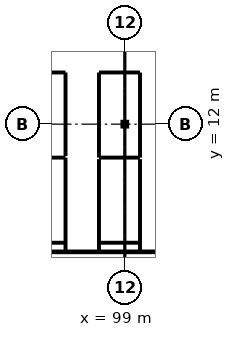
"""IFC4 building model, lengths in metres.
Left out: names, types, materials, properties, quantities, classifications, styles, units other than length and angle.
Written with IfcOpenShell. Run it as: python <this file> out.ifc"""

import sys

from ifc_helpers import new_model, si_unit, direction, frame, frame_2d, origin, origin_2d, place, context, subcontext, project, spatial, rectangle, i_section, extrude, element, fill, save


model = new_model("IFC4")
c1 = context("Model", 3, precision=1e-05, world=origin(), true_north=direction((0.0, 1.0)))
c2 = subcontext(c1, "Body", "Model", "MODEL_VIEW")
j1 = project(units=[si_unit("LENGTHUNIT", "METRE"), si_unit("PLANEANGLEUNIT", "RADIAN")], contexts=[c1])
p1 = place(None, origin())
s1 = spatial("IfcSite", under=j1, at=p1, CompositionType="ELEMENT")
p2 = place(p1, origin())
s2 = spatial("IfcBuilding", under=s1, at=p2, CompositionType="ELEMENT")
p3 = place(p2, frame((0.0, 0.0, 35.4)))
s3 = spatial("IfcBuildingStorey", under=s2, at=p3, CompositionType="ELEMENT", Elevation=35.4)
p4 = place(p3, frame((99.0, 12.0, 0.0), z_axis=(0.0, 0.0, 1.0), x_axis=(1.0, 0.0, 0.0)))
e1 = element("IfcColumn", 1, at=p4, inside=s3, PredefinedType="COLUMN", context=c2, shape_type="SweptSolid", body=[
    extrude(i_section(OverallWidth=0.26, OverallDepth=0.26, WebThickness=0.01, FlangeThickness=0.018, at=origin_2d()), origin(), (0.0, 0.0, 1.0), 3.8),
])
p5 = place(p3, frame((45.88, 3.6, 0.0), z_axis=(0.0, 0.0, 1.0), x_axis=(1.0, 0.0, 0.0)))
e2 = element("IfcWall", 2, at=p5, inside=s3, PredefinedType="PARTITIONING", context=c2, shape_type="SweptSolid", body=[
    extrude(rectangle(XDim=58.24, YDim=0.15, at=frame_2d((29.12, 0.0))), origin(), (0.0, 0.0, 1.0), 3.64),
])
p6 = place(p5, frame((27.795, 0.0, 0.0)))
e3 = element("IfcOpeningElement", 3, at=p6, cuts=e2, PredefinedType="OPENING", context=c2, shape_type="SweptSolid", body=[
    extrude(rectangle(XDim=1.05, YDim=2.25, at=frame_2d((0.525, 1.125))), frame((0.0, 0.09, 0.0), z_axis=(0.0, -1.0, 0.0), x_axis=(1.0, 0.0, 0.0)), (0.0, 0.0, 1.0), 0.18),
])
for number, where, z_axis, x_axis in (
    (4, (95.02, 4.2, 0.0), (0.0, 0.0, 1.0), (-1.0, 0.0, 0.0)),
    (5, (92.055, 9.8, 0.0), (0.0, 0.0, 1.0), (1.0, 0.0, 0.0)),
):
    element("IfcWall", number, at=place(p3, frame(where, z_axis=z_axis, x_axis=x_axis)), inside=s3, PredefinedType="PARTITIONING", context=c2, shape_type="SweptSolid", body=[
        extrude(rectangle(XDim=2.965, YDim=0.1, at=frame_2d((1.482, 0.0))), origin(), (0.0, 0.0, 1.0), 3.64),
    ])
p7 = place(p3, frame((95.1, 9.72, 0.0), z_axis=(0.0, 0.0, 1.0), x_axis=(0.0, -1.0, 0.0)))
e6 = element("IfcWall", 6, at=p7, inside=s3, PredefinedType="PARTITIONING", context=c2, shape_type="SweptSolid", body=[
    extrude(rectangle(XDim=6.05, YDim=0.1, at=frame_2d((3.025, 0.0))), origin(), (0.0, 0.0, 1.0), 3.64),
])
p8 = place(p7, frame((2.529, 0.0, 0.0)))
e7 = element("IfcOpeningElement", 7, at=p8, cuts=e6, PredefinedType="OPENING", context=c2, shape_type="SweptSolid", body=[
    extrude(rectangle(XDim=0.9, YDim=2.05, at=frame_2d((0.45, 1.025))), frame((0.0, 0.065, 0.0), z_axis=(0.0, -1.0, 0.0), x_axis=(1.0, 0.0, 0.0)), (0.0, 0.0, 1.0), 0.13),
])
p9 = place(p3, frame((92.48, 15.4, 0.0), z_axis=(0.0, 0.0, 1.0), x_axis=(1.0, 0.0, 0.0)))
e8 = element("IfcWall", 8, at=p9, inside=s3, PredefinedType="PARTITIONING", context=c2, shape_type="SweptSolid", body=[
    extrude(rectangle(XDim=2.54, YDim=0.1, at=frame_2d((1.27, 0.0))), origin(), (0.0, 0.0, 1.0), 3.64),
])
p10 = place(p3, frame((95.1, 15.32, 0.0), z_axis=(0.0, 0.0, 1.0), x_axis=(0.0, -1.0, 0.0)))
e9 = element("IfcWall", 9, at=p10, inside=s3, PredefinedType="PARTITIONING", context=c2, shape_type="SweptSolid", body=[
    extrude(rectangle(XDim=5.34, YDim=0.1, at=frame_2d((2.67, 0.0))), origin(), (0.0, 0.0, 1.0), 3.64),
])
p11 = place(p10, frame((2.22, 0.0, 0.0)))
e10 = element("IfcOpeningElement", 10, at=p11, cuts=e9, PredefinedType="OPENING", context=c2, shape_type="SweptSolid", body=[
    extrude(rectangle(XDim=0.9, YDim=2.05, at=frame_2d((0.45, 1.025))), frame((0.0, 0.065, 0.0), z_axis=(0.0, -1.0, 0.0), x_axis=(1.0, 0.0, 0.0)), (0.0, 0.0, 1.0), 0.13),
])
p12 = place(p3, frame((97.38, 15.4, 0.0), z_axis=(0.0, 0.0, 1.0), x_axis=(1.0, 0.0, 0.0)))
e11 = element("IfcWall", 11, at=p12, inside=s3, PredefinedType="PARTITIONING", context=c2, shape_type="SweptSolid", body=[
    extrude(rectangle(XDim=2.54, YDim=0.1, at=frame_2d((1.27, 0.0))), origin(), (0.0, 0.0, 1.0), 3.64),
])
p13 = place(p3, frame((100.0, 15.32, 0.0), z_axis=(0.0, 0.0, 1.0), x_axis=(0.0, -1.0, 0.0)))
e12 = element("IfcWall", 12, at=p13, inside=s3, PredefinedType="PARTITIONING", context=c2, shape_type="SweptSolid", body=[
    extrude(rectangle(XDim=5.44, YDim=0.1, at=frame_2d((2.72, 0.0))), origin(), (0.0, 0.0, 1.0), 3.64),
])
p14 = place(p3, frame((99.92, 9.8, 0.0), z_axis=(0.0, 0.0, 1.0), x_axis=(-1.0, 0.0, 0.0)))
e13 = element("IfcWall", 13, at=p14, inside=s3, PredefinedType="PARTITIONING", context=c2, shape_type="SweptSolid", body=[
    extrude(rectangle(XDim=2.54, YDim=0.1, at=frame_2d((1.27, 0.0))), origin(), (0.0, 0.0, 1.0), 3.64),
])
p15 = place(p3, frame((97.3, 9.88, 0.0), z_axis=(0.0, 0.0, 1.0), x_axis=(0.0, 1.0, 0.0)))
e14 = element("IfcWall", 14, at=p15, inside=s3, PredefinedType="PARTITIONING", context=c2, shape_type="SweptSolid", body=[
    extrude(rectangle(XDim=5.44, YDim=0.1, at=frame_2d((2.72, 0.0))), origin(), (0.0, 0.0, 1.0), 3.64),
])
p16 = place(p15, frame((2.22, 0.0, 0.0)))
e15 = element("IfcOpeningElement", 15, at=p16, cuts=e14, PredefinedType="OPENING", context=c2, shape_type="SweptSolid", body=[
    extrude(rectangle(XDim=1.0, YDim=2.1, at=frame_2d((0.5, 1.05))), frame((0.0, 0.065, 0.0), z_axis=(0.0, -1.0, 0.0), x_axis=(1.0, 0.0, 0.0)), (0.0, 0.0, 1.0), 0.13),
])
p17 = place(p3, frame((100.0, 9.62, 0.0), z_axis=(0.0, 0.0, 1.0), x_axis=(0.0, -1.0, 0.0)))
e16 = element("IfcWall", 16, at=p17, inside=s3, PredefinedType="PARTITIONING", context=c2, shape_type="SweptSolid", body=[
    extrude(rectangle(XDim=5.95, YDim=0.1, at=frame_2d((2.975, 0.0))), origin(), (0.0, 0.0, 1.0), 3.64),
])
p18 = place(p3, frame((99.955, 4.2, 0.0), z_axis=(0.0, 0.0, 1.0), x_axis=(-1.0, 0.0, 0.0)))
e17 = element("IfcWall", 17, at=p18, inside=s3, PredefinedType="PARTITIONING", context=c2, shape_type="SweptSolid", body=[
    extrude(rectangle(XDim=2.575, YDim=0.1, at=frame_2d((1.288, 0.0))), origin(), (0.0, 0.0, 1.0), 3.64),
])
p19 = place(p3, frame((97.3, 3.67, 0.0), z_axis=(0.0, 0.0, 1.0), x_axis=(0.0, 1.0, 0.0)))
e18 = element("IfcWall", 18, at=p19, inside=s3, PredefinedType="PARTITIONING", context=c2, shape_type="SweptSolid", body=[
    extrude(rectangle(XDim=5.95, YDim=0.1, at=frame_2d((2.975, 0.0))), origin(), (0.0, 0.0, 1.0), 3.64),
])
p20 = place(p19, frame((2.571, 0.0, 0.0)))
e19 = element("IfcOpeningElement", 19, at=p20, cuts=e18, PredefinedType="OPENING", context=c2, shape_type="SweptSolid", body=[
    extrude(rectangle(XDim=0.9, YDim=2.05, at=frame_2d((0.45, 1.025))), frame((0.0, 0.065, 0.0), z_axis=(0.0, -1.0, 0.0), x_axis=(1.0, 0.0, 0.0)), (0.0, 0.0, 1.0), 0.13),
])
p21 = place(p8, frame((0.9, 0.0, 0.0), z_axis=(0.0, 0.0, 1.0), x_axis=(-1.0, 0.0, 0.0)))
e20 = element("IfcDoor", 20, at=p21, inside=s3, OperationType="SINGLE_SWING_LEFT", PredefinedType="DOOR", context=c2, shape_type="SweptSolid", body=[
    extrude(rectangle(XDim=0.9, YDim=2.05, at=frame_2d((0.45, 1.025))), frame((0.0, 0.025, 0.0), z_axis=(0.0, -1.0, 0.0), x_axis=(1.0, 0.0, 0.0)), (0.0, 0.0, 1.0), 0.05),
])
fill(e7, e20)
p22 = place(p11, origin())
e21 = element("IfcDoor", 21, at=p22, inside=s3, OperationType="SINGLE_SWING_RIGHT", PredefinedType="DOOR", context=c2, shape_type="SweptSolid", body=[
    extrude(rectangle(XDim=0.9, YDim=2.05, at=frame_2d((0.45, 1.025))), frame((0.0, 0.025, 0.0), z_axis=(0.0, -1.0, 0.0), x_axis=(1.0, 0.0, 0.0)), (0.0, 0.0, 1.0), 0.05),
])
fill(e10, e21)
p23 = place(p16, frame((1.0, 0.0, 0.0), z_axis=(0.0, 0.0, 1.0), x_axis=(-1.0, 0.0, 0.0)))
e22 = element("IfcDoor", 22, at=p23, inside=s3, OperationType="SINGLE_SWING_LEFT", PredefinedType="DOOR", context=c2, shape_type="SweptSolid", body=[
    extrude(rectangle(XDim=1.0, YDim=2.1, at=frame_2d((0.5, 1.05))), frame((0.0, 0.025, 0.0), z_axis=(0.0, -1.0, 0.0), x_axis=(1.0, 0.0, 0.0)), (0.0, 0.0, 1.0), 0.05),
])
fill(e15, e22)
p24 = place(p20, origin())
e23 = element("IfcDoor", 23, at=p24, inside=s3, OperationType="SINGLE_SWING_RIGHT", PredefinedType="DOOR", context=c2, shape_type="SweptSolid", body=[
    extrude(rectangle(XDim=0.9, YDim=2.05, at=frame_2d((0.45, 1.025))), frame((0.0, 0.025, 0.0), z_axis=(0.0, -1.0, 0.0), x_axis=(1.0, 0.0, 0.0)), (0.0, 0.0, 1.0), 0.05),
])
fill(e19, e23)
save(model, sys.argv[1])
